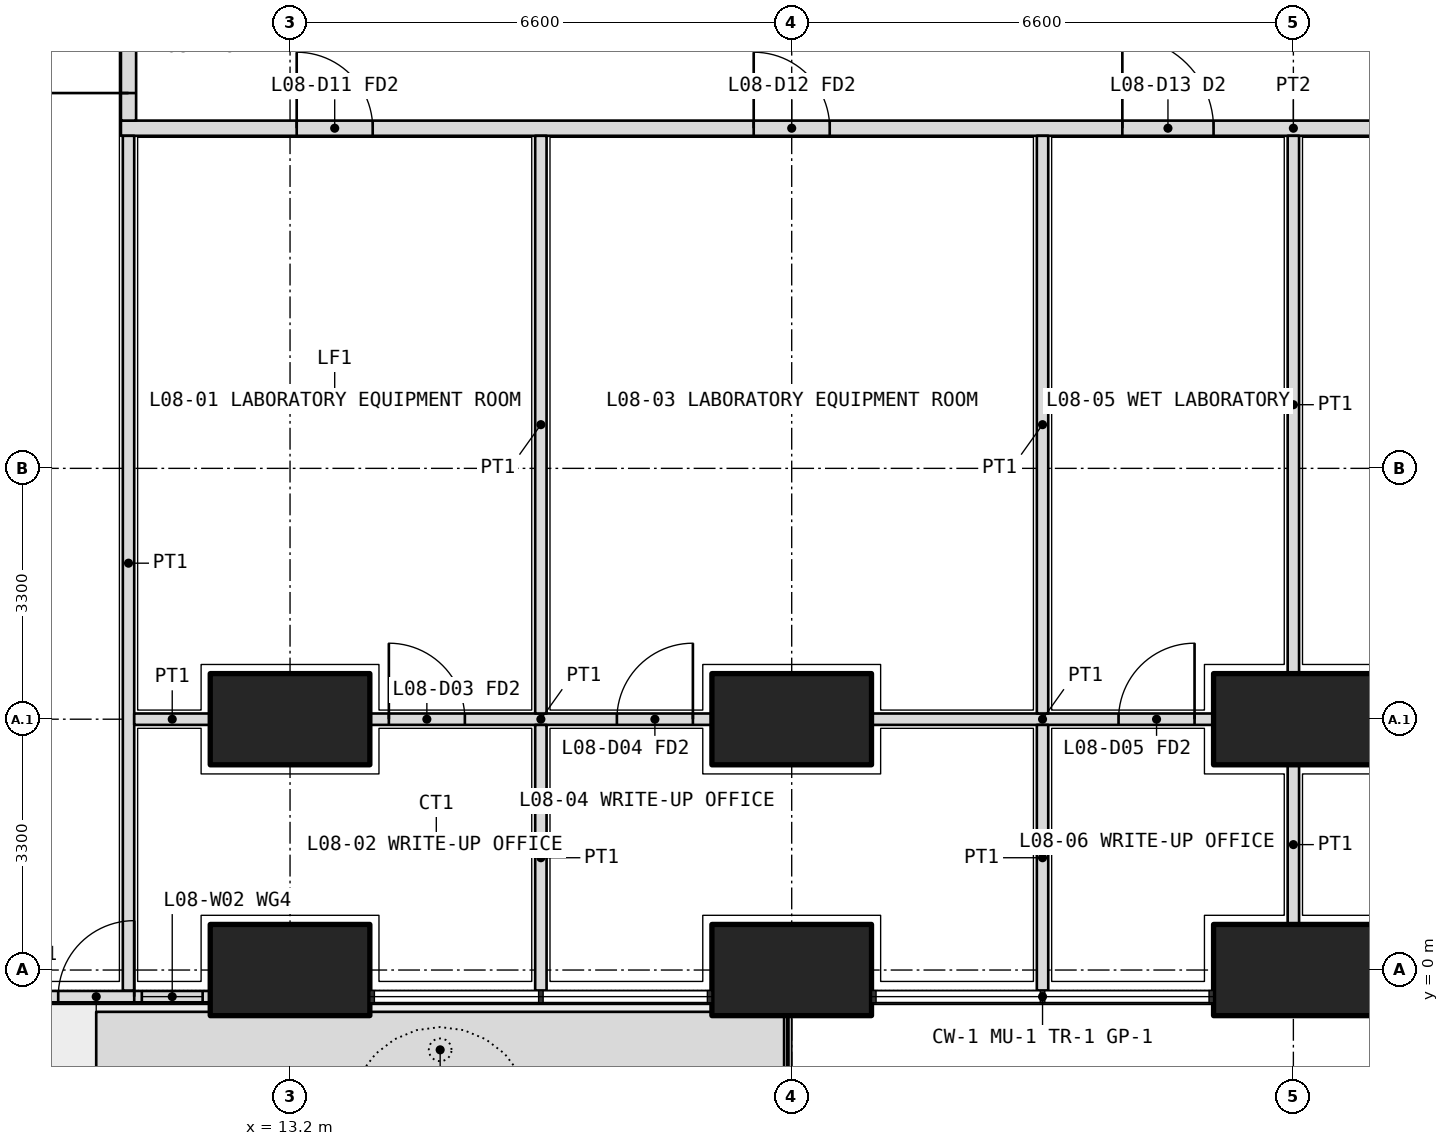
"""IFC4 building model, lengths in metres.
Left out: names, types, materials, properties, quantities, classifications, styles, units other than length and angle.
Written with IfcOpenShell. Run it as: python <this file> out.ifc"""

import sys

from ifc_helpers import new_model, si_unit, direction, frame, frame_2d, origin, origin_2d, place, context, subcontext, project, spatial, polyline, rectangle, outline, extrude, element, fill, save


model = new_model("IFC4")
c1 = context("Model", 3, precision=1e-05, world=origin(), true_north=direction((0.0, 1.0)))
c2 = subcontext(c1, "Body", "Model", "MODEL_VIEW")
j1 = project(units=[si_unit("LENGTHUNIT", "METRE"), si_unit("PLANEANGLEUNIT", "RADIAN")], contexts=[c1])
p1 = place(None, origin())
s1 = spatial("IfcSite", under=j1, at=p1, CompositionType="ELEMENT")
p2 = place(p1, origin())
s2 = spatial("IfcBuilding", under=s1, at=p2, CompositionType="ELEMENT")
p3 = place(p2, frame((0.0, 0.0, 38.1)))
s3 = spatial("IfcBuildingStorey", under=s2, at=p3, CompositionType="ELEMENT", Elevation=38.1)
for number, where, z_axis, x_axis in (
    (1, (13.2, 0.0, 0.0), (0.0, 0.0, 1.0), (1.0, 0.0, 0.0)),
    (2, (19.8, 0.0, 0.0), (0.0, 0.0, 1.0), (1.0, 0.0, 0.0)),
    (3, (26.4, 0.0, 0.0), (0.0, 0.0, 1.0), (1.0, 0.0, 0.0)),
    (4, (13.2, 3.3, 0.0), (0.0, 0.0, 1.0), (1.0, 0.0, 0.0)),
    (5, (19.8, 3.3, 0.0), (0.0, 0.0, 1.0), (1.0, 0.0, 0.0)),
    (6, (26.4, 3.3, 0.0), (0.0, 0.0, 1.0), (1.0, 0.0, 0.0)),
):
    element("IfcColumn", number, at=place(p3, frame(where, z_axis=z_axis, x_axis=x_axis)), inside=s3, PredefinedType="COLUMN", context=c2, shape_type="SweptSolid", body=[
        extrude(rectangle(XDim=2.1, YDim=1.2, at=origin_2d()), origin(), (0.0, 0.0, 1.0), 4.2),
    ])
p4 = place(p3, origin())
e7 = element("IfcWall", 7, at=p4, inside=s3, PredefinedType="USERDEFINED", context=c2, shape_type="SweptSolid", body=[
    extrude(outline(polyline([(10.65, -1.55), (19.7, -1.55), (19.7, -0.55), (10.65, -0.55), (10.65, -1.55)]), holes=[polyline([(10.8, -1.4), (19.55, -1.4), (19.55, -0.7), (10.8, -0.7), (10.8, -1.4)])]), origin(), (0.0, 0.0, 1.0), 1.05),
])
p5 = place(p3, frame((7.65, -0.35, 0.0), z_axis=(0.0, 0.0, 1.0), x_axis=(1.0, 0.0, 0.0)))
e8 = element("IfcWall", 8, at=p5, inside=s3, PredefinedType="SOLIDWALL", context=c2, shape_type="SweptSolid", body=[
    extrude(rectangle(XDim=4.5, YDim=0.15, at=frame_2d((2.25, 0.0))), origin(), (0.0, 0.0, 1.0), 2.7),
])
p6 = place(p5, frame((2.5, 0.0, 0.0)))
e9 = element("IfcOpeningElement", 9, at=p6, cuts=e8, PredefinedType="OPENING", context=c2, shape_type="SweptSolid", body=[
    extrude(rectangle(XDim=1.0, YDim=2.4, at=frame_2d((0.5, 1.2))), frame((0.0, 0.085, 0.0), z_axis=(0.0, -1.0, 0.0), x_axis=(1.0, 0.0, 0.0)), (0.0, 0.0, 1.0), 0.17),
])
p7 = place(p5, frame((0.1, 0.0, 0.1)))
e10 = element("IfcOpeningElement", 10, at=p7, cuts=e8, PredefinedType="OPENING", context=c2, shape_type="SweptSolid", body=[
    extrude(rectangle(XDim=1.9, YDim=2.3, at=frame_2d((0.95, 1.15))), frame((0.0, 0.085, 0.0), z_axis=(0.0, -1.0, 0.0), x_axis=(1.0, 0.0, 0.0)), (0.0, 0.0, 1.0), 0.17),
])
p8 = place(p5, frame((3.6, 0.0, 0.1)))
e11 = element("IfcOpeningElement", 11, at=p8, cuts=e8, PredefinedType="OPENING", context=c2, shape_type="SweptSolid", body=[
    extrude(rectangle(XDim=0.8, YDim=2.3, at=frame_2d((0.4, 1.15))), frame((0.0, 0.085, 0.0), z_axis=(0.0, -1.0, 0.0), x_axis=(1.0, 0.0, 0.0)), (0.0, 0.0, 1.0), 0.17),
])
p9 = place(p3, frame((10.975, 11.075, 0.0), z_axis=(0.0, 0.0, 1.0), x_axis=(1.0, 0.0, 0.0)))
e12 = element("IfcWall", 12, at=p9, inside=s3, PredefinedType="PARTITIONING", context=c2, shape_type="SweptSolid", body=[
    extrude(rectangle(XDim=30.85, YDim=0.2, at=frame_2d((15.425, 0.0))), origin(), (0.0, 0.0, 1.0), 2.85),
])
p10 = place(p9, frame((2.312, 0.0, 0.0)))
e13 = element("IfcOpeningElement", 13, at=p10, cuts=e12, PredefinedType="OPENING", context=c2, shape_type="SweptSolid", body=[
    extrude(rectangle(XDim=1.0, YDim=2.1, at=frame_2d((0.5, 1.05))), frame((0.0, 0.11, 0.0), z_axis=(0.0, -1.0, 0.0), x_axis=(1.0, 0.0, 0.0)), (0.0, 0.0, 1.0), 0.22),
])
p11 = place(p9, frame((8.325, 0.0, 0.0)))
e14 = element("IfcOpeningElement", 14, at=p11, cuts=e12, PredefinedType="OPENING", context=c2, shape_type="SweptSolid", body=[
    extrude(rectangle(XDim=1.0, YDim=2.1, at=frame_2d((0.5, 1.05))), frame((0.0, 0.11, 0.0), z_axis=(0.0, -1.0, 0.0), x_axis=(1.0, 0.0, 0.0)), (0.0, 0.0, 1.0), 0.22),
])
p12 = place(p9, frame((13.175, 0.0, 0.0)))
e15 = element("IfcOpeningElement", 15, at=p12, cuts=e12, PredefinedType="OPENING", context=c2, shape_type="SweptSolid", body=[
    extrude(rectangle(XDim=1.2, YDim=2.1, at=frame_2d((0.6, 1.05))), frame((0.0, 0.11, 0.0), z_axis=(0.0, -1.0, 0.0), x_axis=(1.0, 0.0, 0.0)), (0.0, 0.0, 1.0), 0.22),
])
p13 = place(p9, frame((19.875, 0.0, 0.0)))
e16 = element("IfcOpeningElement", 16, at=p13, cuts=e12, PredefinedType="OPENING", context=c2, shape_type="SweptSolid", body=[
    extrude(rectangle(XDim=1.0, YDim=2.1, at=frame_2d((0.5, 1.05))), frame((0.0, 0.11, 0.0), z_axis=(0.0, -1.0, 0.0), x_axis=(1.0, 0.0, 0.0)), (0.0, 0.0, 1.0), 0.22),
])
p14 = place(p9, frame((27.538, 0.0, 0.0)))
e17 = element("IfcOpeningElement", 17, at=p14, cuts=e12, PredefinedType="OPENING", context=c2, shape_type="SweptSolid", body=[
    extrude(rectangle(XDim=1.0, YDim=2.1, at=frame_2d((0.5, 1.05))), frame((0.0, 0.11, 0.0), z_axis=(0.0, -1.0, 0.0), x_axis=(1.0, 0.0, 0.0)), (0.0, 0.0, 1.0), 0.22),
])
p15 = place(p3, frame((11.075, 11.175, 0.0), z_axis=(0.0, 0.0, 1.0), x_axis=(0.0, 1.0, 0.0)))
e18 = element("IfcWall", 18, at=p15, inside=s3, PredefinedType="PARTITIONING", context=c2, shape_type="SweptSolid", body=[
    extrude(rectangle(XDim=23.85, YDim=0.2, at=frame_2d((11.925, 0.0))), origin(), (0.0, 0.0, 1.0), 2.85),
])
p16 = place(p15, frame((0.363, 0.0, 0.0)))
e19 = element("IfcOpeningElement", 19, at=p16, cuts=e18, PredefinedType="OPENING", context=c2, shape_type="SweptSolid", body=[
    extrude(rectangle(XDim=1.2, YDim=2.1, at=frame_2d((0.6, 1.05))), frame((0.0, 0.11, 0.0), z_axis=(0.0, -1.0, 0.0), x_axis=(1.0, 0.0, 0.0)), (0.0, 0.0, 1.0), 0.22),
])
p17 = place(p15, frame((2.575, 0.0, 0.0)))
e20 = element("IfcOpeningElement", 20, at=p17, cuts=e18, PredefinedType="OPENING", context=c2, shape_type="SweptSolid", body=[
    extrude(rectangle(XDim=1.0, YDim=2.1, at=frame_2d((0.5, 1.05))), frame((0.0, 0.11, 0.0), z_axis=(0.0, -1.0, 0.0), x_axis=(1.0, 0.0, 0.0)), (0.0, 0.0, 1.0), 0.22),
])
p18 = place(p15, frame((5.625, 0.0, 0.0)))
e21 = element("IfcOpeningElement", 21, at=p18, cuts=e18, PredefinedType="OPENING", context=c2, shape_type="SweptSolid", body=[
    extrude(rectangle(XDim=0.9, YDim=2.1, at=frame_2d((0.45, 1.05))), frame((0.0, 0.11, 0.0), z_axis=(0.0, -1.0, 0.0), x_axis=(1.0, 0.0, 0.0)), (0.0, 0.0, 1.0), 0.22),
])
p19 = place(p15, frame((9.425, 0.0, 0.0)))
e22 = element("IfcOpeningElement", 22, at=p19, cuts=e18, PredefinedType="OPENING", context=c2, shape_type="SweptSolid", body=[
    extrude(rectangle(XDim=0.9, YDim=2.1, at=frame_2d((0.45, 1.05))), frame((0.0, 0.11, 0.0), z_axis=(0.0, -1.0, 0.0), x_axis=(1.0, 0.0, 0.0)), (0.0, 0.0, 1.0), 0.22),
])
p20 = place(p15, frame((12.975, 0.0, 0.0)))
e23 = element("IfcOpeningElement", 23, at=p20, cuts=e18, PredefinedType="OPENING", context=c2, shape_type="SweptSolid", body=[
    extrude(rectangle(XDim=1.0, YDim=2.1, at=frame_2d((0.5, 1.05))), frame((0.0, 0.11, 0.0), z_axis=(0.0, -1.0, 0.0), x_axis=(1.0, 0.0, 0.0)), (0.0, 0.0, 1.0), 0.22),
])
p21 = place(p15, frame((16.375, 0.0, 0.0)))
e24 = element("IfcOpeningElement", 24, at=p21, cuts=e18, PredefinedType="OPENING", context=c2, shape_type="SweptSolid", body=[
    extrude(rectangle(XDim=1.0, YDim=2.1, at=frame_2d((0.5, 1.05))), frame((0.0, 0.11, 0.0), z_axis=(0.0, -1.0, 0.0), x_axis=(1.0, 0.0, 0.0)), (0.0, 0.0, 1.0), 0.22),
])
p22 = place(p15, frame((19.675, 0.0, 0.0)))
e25 = element("IfcOpeningElement", 25, at=p22, cuts=e18, PredefinedType="OPENING", context=c2, shape_type="SweptSolid", body=[
    extrude(rectangle(XDim=1.0, YDim=2.1, at=frame_2d((0.5, 1.05))), frame((0.0, 0.11, 0.0), z_axis=(0.0, -1.0, 0.0), x_axis=(1.0, 0.0, 0.0)), (0.0, 0.0, 1.0), 0.22),
])
p23 = place(p15, frame((22.387, 0.0, 0.0)))
e26 = element("IfcOpeningElement", 26, at=p23, cuts=e18, PredefinedType="OPENING", context=c2, shape_type="SweptSolid", body=[
    extrude(rectangle(XDim=1.0, YDim=2.1, at=frame_2d((0.5, 1.05))), frame((0.0, 0.11, 0.0), z_axis=(0.0, -1.0, 0.0), x_axis=(1.0, 0.0, 0.0)), (0.0, 0.0, 1.0), 0.22),
])
p24 = place(p3, frame((11.075, -0.27, 0.0), z_axis=(0.0, 0.0, 1.0), x_axis=(0.0, 1.0, 0.0)))
e27 = element("IfcWall", 27, at=p24, inside=s3, PredefinedType="PARTITIONING", context=c2, shape_type="SweptSolid", body=[
    extrude(rectangle(XDim=11.245, YDim=0.15, at=frame_2d((5.623, 0.0))), origin(), (0.0, 0.0, 1.0), 2.7),
])
p25 = place(p3, frame((11.15, 3.3, 0.0), z_axis=(0.0, 0.0, 1.0), x_axis=(1.0, 0.0, 0.0)))
e28 = element("IfcWall", 28, at=p25, inside=s3, PredefinedType="PARTITIONING", context=c2, shape_type="SweptSolid", body=[
    extrude(rectangle(XDim=1.0, YDim=0.15, at=frame_2d((0.5, 0.0))), origin(), (0.0, 0.0, 1.0), 3.9),
])
p26 = place(p3, frame((14.25, 3.3, 0.0), z_axis=(0.0, 0.0, 1.0), x_axis=(1.0, 0.0, 0.0)))
e29 = element("IfcWall", 29, at=p26, inside=s3, PredefinedType="PARTITIONING", context=c2, shape_type="SweptSolid", body=[
    extrude(rectangle(XDim=4.5, YDim=0.15, at=frame_2d((2.25, 0.0))), origin(), (0.0, 0.0, 1.0), 3.9),
])
p27 = place(p26, frame((0.25, 0.0, 0.0)))
e30 = element("IfcOpeningElement", 30, at=p27, cuts=e29, PredefinedType="OPENING", context=c2, shape_type="SweptSolid", body=[
    extrude(rectangle(XDim=1.0, YDim=2.1, at=frame_2d((0.5, 1.05))), frame((0.0, 0.085, 0.0), z_axis=(0.0, -1.0, 0.0), x_axis=(1.0, 0.0, 0.0)), (0.0, 0.0, 1.0), 0.17),
])
p28 = place(p26, frame((3.25, 0.0, 0.0)))
e31 = element("IfcOpeningElement", 31, at=p28, cuts=e29, PredefinedType="OPENING", context=c2, shape_type="SweptSolid", body=[
    extrude(rectangle(XDim=1.0, YDim=2.1, at=frame_2d((0.5, 1.05))), frame((0.0, 0.085, 0.0), z_axis=(0.0, -1.0, 0.0), x_axis=(1.0, 0.0, 0.0)), (0.0, 0.0, 1.0), 0.17),
])
p29 = place(p3, frame((20.85, 3.3, 0.0), z_axis=(0.0, 0.0, 1.0), x_axis=(1.0, 0.0, 0.0)))
e32 = element("IfcWall", 32, at=p29, inside=s3, PredefinedType="PARTITIONING", context=c2, shape_type="SweptSolid", body=[
    extrude(rectangle(XDim=4.5, YDim=0.15, at=frame_2d((2.25, 0.0))), origin(), (0.0, 0.0, 1.0), 3.9),
])
p30 = place(p29, frame((3.25, 0.0, 0.0)))
e33 = element("IfcOpeningElement", 33, at=p30, cuts=e32, PredefinedType="OPENING", context=c2, shape_type="SweptSolid", body=[
    extrude(rectangle(XDim=1.0, YDim=2.1, at=frame_2d((0.5, 1.05))), frame((0.0, 0.085, 0.0), z_axis=(0.0, -1.0, 0.0), x_axis=(1.0, 0.0, 0.0)), (0.0, 0.0, 1.0), 0.17),
])
p31 = place(p3, frame((16.5, -0.27, 0.0), z_axis=(0.0, 0.0, 1.0), x_axis=(0.0, 1.0, 0.0)))
e34 = element("IfcWall", 34, at=p31, inside=s3, PredefinedType="PARTITIONING", context=c2, shape_type="SweptSolid", body=[
    extrude(rectangle(XDim=3.495, YDim=0.15, at=frame_2d((1.748, 0.0))), origin(), (0.0, 0.0, 1.0), 2.7),
])
p32 = place(p3, frame((16.5, 3.375, 0.0), z_axis=(0.0, 0.0, 1.0), x_axis=(0.0, 1.0, 0.0)))
e35 = element("IfcWall", 35, at=p32, inside=s3, PredefinedType="PARTITIONING", context=c2, shape_type="SweptSolid", body=[
    extrude(rectangle(XDim=7.6, YDim=0.15, at=frame_2d((3.8, 0.0))), origin(), (0.0, 0.0, 1.0), 3.9),
])
p33 = place(p3, frame((23.1, -0.27, 0.0), z_axis=(0.0, 0.0, 1.0), x_axis=(0.0, 1.0, 0.0)))
e36 = element("IfcWall", 36, at=p33, inside=s3, PredefinedType="PARTITIONING", context=c2, shape_type="SweptSolid", body=[
    extrude(rectangle(XDim=3.495, YDim=0.15, at=frame_2d((1.748, 0.0))), origin(), (0.0, 0.0, 1.0), 2.7),
])
p34 = place(p3, frame((23.1, 3.375, 0.0), z_axis=(0.0, 0.0, 1.0), x_axis=(0.0, 1.0, 0.0)))
e37 = element("IfcWall", 37, at=p34, inside=s3, PredefinedType="PARTITIONING", context=c2, shape_type="SweptSolid", body=[
    extrude(rectangle(XDim=7.6, YDim=0.15, at=frame_2d((3.8, 0.0))), origin(), (0.0, 0.0, 1.0), 3.9),
])
p35 = place(p3, frame((26.4, 0.6, 0.0), z_axis=(0.0, 0.0, 1.0), x_axis=(0.0, 1.0, 0.0)))
e38 = element("IfcWall", 38, at=p35, inside=s3, PredefinedType="PARTITIONING", context=c2, shape_type="SweptSolid", body=[
    extrude(rectangle(XDim=2.1, YDim=0.15, at=frame_2d((1.05, 0.0))), origin(), (0.0, 0.0, 1.0), 2.85),
])
p36 = place(p3, frame((26.4, 3.9, 0.0), z_axis=(0.0, 0.0, 1.0), x_axis=(0.0, 1.0, 0.0)))
e39 = element("IfcWall", 39, at=p36, inside=s3, PredefinedType="PARTITIONING", context=c2, shape_type="SweptSolid", body=[
    extrude(rectangle(XDim=7.075, YDim=0.15, at=frame_2d((3.538, 0.0))), origin(), (0.0, 0.0, 1.0), 2.85),
])
p37 = place(p6, origin())
e40 = element("IfcDoor", 40, at=p37, inside=s3, OperationType="SINGLE_SWING_RIGHT", PredefinedType="DOOR", context=c2, shape_type="SweptSolid", body=[
    extrude(rectangle(XDim=1.0, YDim=2.4, at=frame_2d((0.5, 1.2))), frame((0.0, 0.025, 0.0), z_axis=(0.0, -1.0, 0.0), x_axis=(1.0, 0.0, 0.0)), (0.0, 0.0, 1.0), 0.05),
])
fill(e9, e40)
p38 = place(p8, origin())
e41 = element("IfcWindow", 41, at=p38, inside=s3, PartitioningType="SINGLE_PANEL", PredefinedType="WINDOW", context=c2, shape_type="SweptSolid", body=[
    extrude(rectangle(XDim=0.8, YDim=2.3, at=frame_2d((0.4, 1.15))), frame((0.0, 0.03, 0.0), z_axis=(0.0, -1.0, 0.0), x_axis=(1.0, 0.0, 0.0)), (0.0, 0.0, 1.0), 0.06),
])
fill(e11, e41)
p39 = place(p10, origin())
e42 = element("IfcDoor", 42, at=p39, inside=s3, OperationType="SINGLE_SWING_LEFT", PredefinedType="DOOR", context=c2, shape_type="SweptSolid", body=[
    extrude(rectangle(XDim=1.0, YDim=2.1, at=frame_2d((0.5, 1.05))), frame((0.0, 0.025, 0.0), z_axis=(0.0, -1.0, 0.0), x_axis=(1.0, 0.0, 0.0)), (0.0, 0.0, 1.0), 0.05),
])
fill(e13, e42)
p40 = place(p27, origin())
e43 = element("IfcDoor", 43, at=p40, inside=s3, OperationType="SINGLE_SWING_LEFT", PredefinedType="DOOR", context=c2, shape_type="SweptSolid", body=[
    extrude(rectangle(XDim=1.0, YDim=2.1, at=frame_2d((0.5, 1.05))), frame((0.0, 0.025, 0.0), z_axis=(0.0, -1.0, 0.0), x_axis=(1.0, 0.0, 0.0)), (0.0, 0.0, 1.0), 0.05),
])
fill(e30, e43)
p41 = place(p11, origin())
e44 = element("IfcDoor", 44, at=p41, inside=s3, OperationType="SINGLE_SWING_LEFT", PredefinedType="DOOR", context=c2, shape_type="SweptSolid", body=[
    extrude(rectangle(XDim=1.0, YDim=2.1, at=frame_2d((0.5, 1.05))), frame((0.0, 0.025, 0.0), z_axis=(0.0, -1.0, 0.0), x_axis=(1.0, 0.0, 0.0)), (0.0, 0.0, 1.0), 0.05),
])
fill(e14, e44)
p42 = place(p28, origin())
e45 = element("IfcDoor", 45, at=p42, inside=s3, OperationType="SINGLE_SWING_RIGHT", PredefinedType="DOOR", context=c2, shape_type="SweptSolid", body=[
    extrude(rectangle(XDim=1.0, YDim=2.1, at=frame_2d((0.5, 1.05))), frame((0.0, 0.025, 0.0), z_axis=(0.0, -1.0, 0.0), x_axis=(1.0, 0.0, 0.0)), (0.0, 0.0, 1.0), 0.05),
])
fill(e31, e45)
p43 = place(p12, origin())
e46 = element("IfcDoor", 46, at=p43, inside=s3, OperationType="DOUBLE_DOOR_SINGLE_SWING", PredefinedType="DOOR", context=c2, shape_type="SweptSolid", body=[
    extrude(rectangle(XDim=1.2, YDim=2.1, at=frame_2d((0.6, 1.05))), frame((0.0, 0.025, 0.0), z_axis=(0.0, -1.0, 0.0), x_axis=(1.0, 0.0, 0.0)), (0.0, 0.0, 1.0), 0.05),
])
fill(e15, e46)
p44 = place(p30, origin())
e47 = element("IfcDoor", 47, at=p44, inside=s3, OperationType="SINGLE_SWING_RIGHT", PredefinedType="DOOR", context=c2, shape_type="SweptSolid", body=[
    extrude(rectangle(XDim=1.0, YDim=2.1, at=frame_2d((0.5, 1.05))), frame((0.0, 0.025, 0.0), z_axis=(0.0, -1.0, 0.0), x_axis=(1.0, 0.0, 0.0)), (0.0, 0.0, 1.0), 0.05),
])
fill(e33, e47)
p45 = place(p16, origin())
e48 = element("IfcDoor", 48, at=p45, inside=s3, OperationType="DOUBLE_DOOR_SINGLE_SWING", PredefinedType="DOOR", context=c2, shape_type="SweptSolid", body=[
    extrude(rectangle(XDim=1.2, YDim=2.1, at=frame_2d((0.6, 1.05))), frame((0.0, 0.025, 0.0), z_axis=(0.0, -1.0, 0.0), x_axis=(1.0, 0.0, 0.0)), (0.0, 0.0, 1.0), 0.05),
])
fill(e19, e48)
save(model, sys.argv[1])
